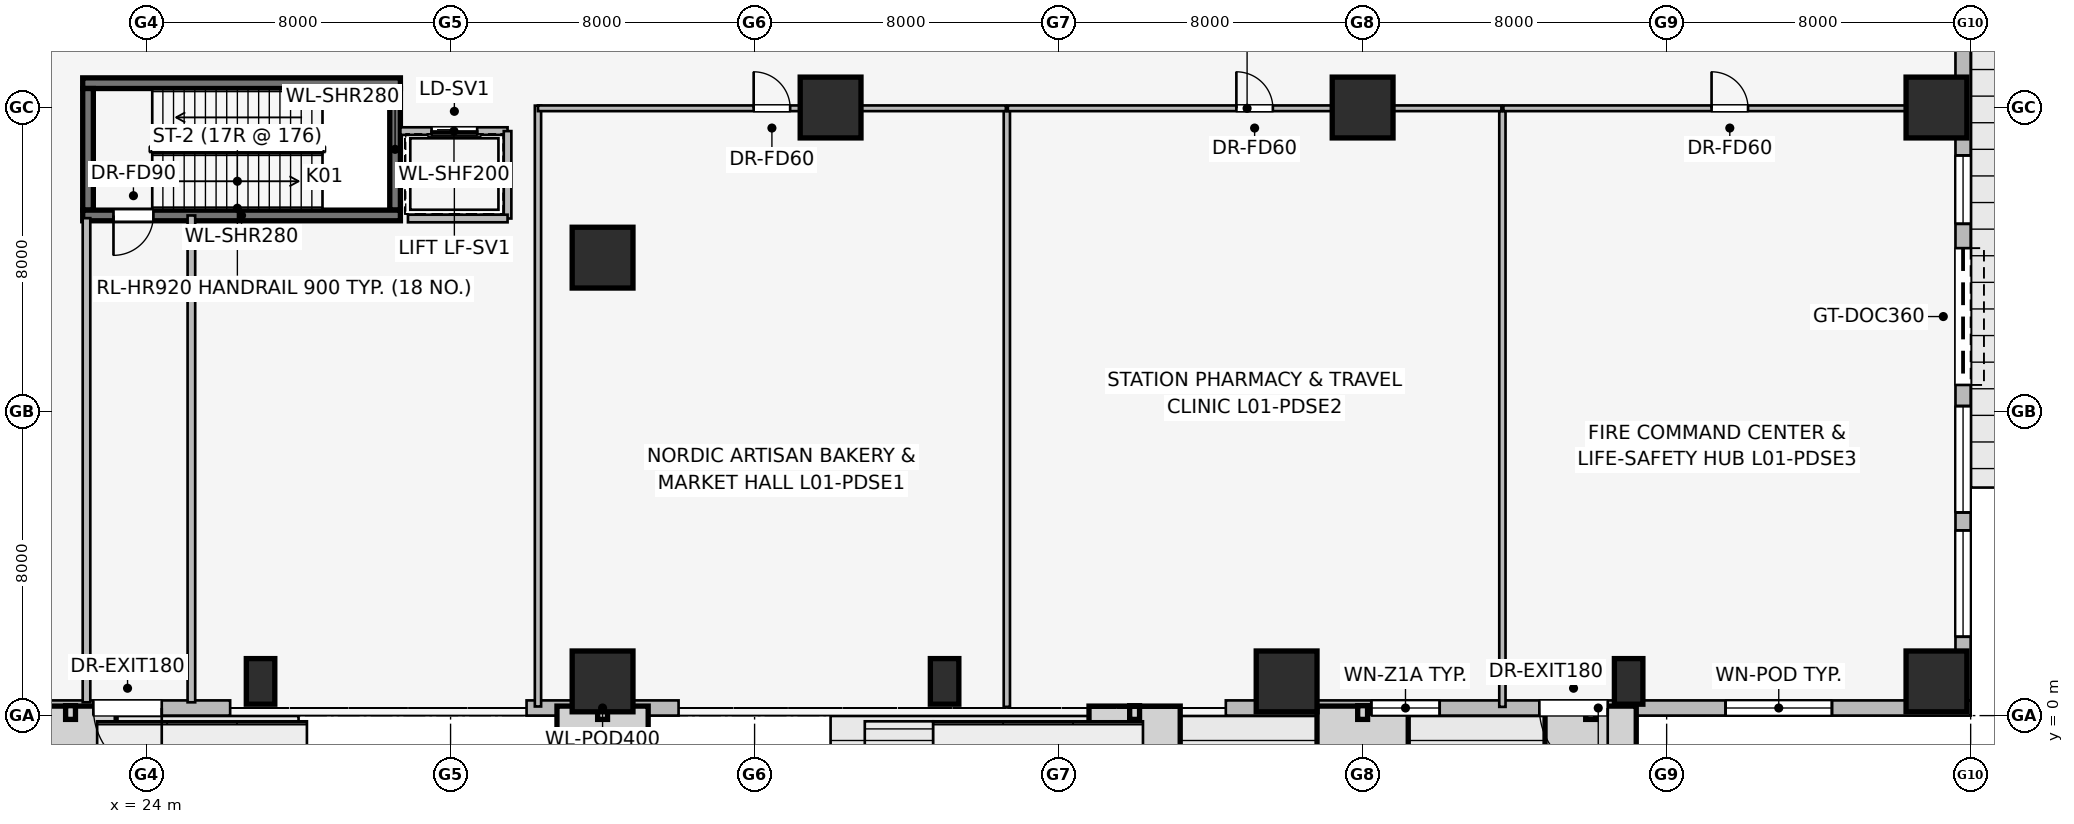
"""IFC4 building model, lengths in metres.
Left out: names, types, materials, properties, quantities, classifications, styles, units other than length and angle.
Written with IfcOpenShell. Run it as: python <this file> out.ifc"""

import sys

from ifc_helpers import new_model, si_unit, direction, frame, frame_2d, origin, origin_2d, place, context, subcontext, project, spatial, rectangle, extrude, element, fill, save


model = new_model("IFC4")
c1 = context("Model", 3, precision=1e-05, world=origin(), true_north=direction((0.0, 1.0)))
c2 = subcontext(c1, "Body", "Model", "MODEL_VIEW")
j1 = project(units=[si_unit("LENGTHUNIT", "METRE"), si_unit("PLANEANGLEUNIT", "RADIAN")], contexts=[c1])
p1 = place(None, origin())
s1 = spatial("IfcSite", under=j1, at=p1, CompositionType="ELEMENT")
p2 = place(p1, origin())
s2 = spatial("IfcBuilding", under=s1, at=p2, CompositionType="ELEMENT")
p3 = place(p2, origin())
s3 = spatial("IfcBuildingStorey", under=s2, at=p3, CompositionType="ELEMENT", Elevation=0.0)
p4 = place(p3, frame((30.68, 16.64, 0.0), z_axis=(0.0, 0.0, 1.0), x_axis=(-1.0, 0.0, 0.0)))
e1 = element("IfcWall", 1, at=p4, inside=s3, PredefinedType="SHEAR", context=c2, shape_type="SweptSolid", body=[
    extrude(rectangle(XDim=8.36, YDim=0.28, at=frame_2d((4.18, 0.0))), origin(), (0.0, 0.0, 1.0), 6.0),
])
for number, where, z_axis, x_axis in (
    (2, (22.46, 16.5, 0.0), (0.0, 0.0, 1.0), (0.0, -1.0, 0.0)),
    (3, (30.54, 13.3, 0.0), (0.0, 0.0, 1.0), (0.0, 1.0, 0.0)),
):
    element("IfcWall", number, at=place(p3, frame(where, z_axis=z_axis, x_axis=x_axis)), inside=s3, PredefinedType="SHEAR", context=c2, shape_type="SweptSolid", body=[
        extrude(rectangle(XDim=3.2, YDim=0.28, at=frame_2d((1.6, 0.0))), origin(), (0.0, 0.0, 1.0), 6.0),
    ])
p5 = place(p3, frame((30.68, 13.16, 0.0), z_axis=(0.0, 0.0, 1.0), x_axis=(-1.0, 0.0, 0.0)))
e4 = element("IfcWall", 4, at=p5, inside=s3, PredefinedType="SHEAR", context=c2, shape_type="SweptSolid", body=[
    extrude(rectangle(XDim=8.36, YDim=0.28, at=frame_2d((4.18, 0.0))), origin(), (0.0, 0.0, 1.0), 6.0),
])
p6 = place(p5, frame((6.5, 0.0, 0.0)))
e5 = element("IfcOpeningElement", 5, at=p6, cuts=e4, PredefinedType="OPENING", context=c2, shape_type="SweptSolid", body=[
    extrude(rectangle(XDim=1.05, YDim=2.0, at=frame_2d((0.525, 1.0))), frame((0.0, 0.15, 0.0), z_axis=(0.0, -1.0, 0.0), x_axis=(1.0, 0.0, 0.0)), (0.0, 0.0, 1.0), 0.3),
])
for number, where, z_axis, x_axis in (
    (6, (71.1, 0.9, 0.0), (0.0, 0.0, 1.0), (1.0, 0.0, 0.0)),
    (7, (36.0, 0.9, 0.0), (0.0, 0.0, 1.0), (1.0, 0.0, 0.0)),
    (8, (54.0, 0.9, 0.0), (0.0, 0.0, 1.0), (1.0, 0.0, 0.0)),
    (9, (71.1, 16.0, 0.0), (0.0, 0.0, 1.0), (1.0, 0.0, 0.0)),
    (10, (42.0, 16.0, 0.0), (0.0, 0.0, 1.0), (1.0, 0.0, 0.0)),
    (11, (56.0, 16.0, 0.0), (0.0, 0.0, 1.0), (1.0, 0.0, 0.0)),
    (12, (36.0, 12.05, 0.0), (0.0, 0.0, 1.0), (1.0, 0.0, 0.0)),
):
    element("IfcColumn", number, at=place(p3, frame(where, z_axis=z_axis, x_axis=x_axis)), inside=s3, PredefinedType="COLUMN", context=c2, shape_type="SweptSolid", body=[
        extrude(rectangle(XDim=1.6, YDim=1.6, at=origin_2d()), origin(), (0.0, 0.0, 1.0), 6.0),
    ])
for number, where, z_axis, x_axis in (
    (13, (27.0, 0.9, 0.0), (0.0, 0.0, 1.0), (1.0, 0.0, 0.0)),
    (14, (45.0, 0.9, 0.0), (0.0, 0.0, 1.0), (1.0, 0.0, 0.0)),
    (15, (63.0, 0.9, 0.0), (0.0, 0.0, 1.0), (1.0, 0.0, 0.0)),
):
    element("IfcColumn", number, at=place(p3, frame(where, z_axis=z_axis, x_axis=x_axis)), inside=s3, PredefinedType="PILASTER", context=c2, shape_type="SweptSolid", body=[
        extrude(rectangle(XDim=0.75, YDim=1.2, at=origin_2d()), origin(), (0.0, 0.0, 1.0), 6.0),
    ])
p7 = place(p3, frame((72.0, 0.2, 0.0), z_axis=(0.0, 0.0, 1.0), x_axis=(-1.0, 0.0, 0.0)))
e16 = element("IfcWall", 16, at=p7, inside=s3, PredefinedType="STANDARD", context=c2, shape_type="SweptSolid", body=[
    extrude(rectangle(XDim=19.6, YDim=0.4, at=frame_2d((9.8, 0.0))), origin(), (0.0, 0.0, 1.0), 5.69),
])
p8 = place(p7, frame((9.55, 0.0, 0.0)))
e17 = element("IfcOpeningElement", 17, at=p8, cuts=e16, PredefinedType="OPENING", context=c2, shape_type="SweptSolid", body=[
    extrude(rectangle(XDim=1.8, YDim=2.3, at=frame_2d((0.9, 1.15))), frame((0.0, 0.21, 0.0), z_axis=(0.0, -1.0, 0.0), x_axis=(1.0, 0.0, 0.0)), (0.0, 0.0, 1.0), 0.42),
])
p9 = place(p7, frame((3.65, 0.0, 0.75)))
e18 = element("IfcOpeningElement", 18, at=p9, cuts=e16, PredefinedType="OPENING", context=c2, shape_type="SweptSolid", body=[
    extrude(rectangle(XDim=2.8, YDim=1.8, at=frame_2d((1.4, 0.9))), frame((0.0, 0.21, 0.0), z_axis=(0.0, -1.0, 0.0), x_axis=(1.0, 0.0, 0.0)), (0.0, 0.0, 1.0), 0.42),
])
p10 = place(p7, frame((13.972, 0.0, 0.75)))
e19 = element("IfcOpeningElement", 19, at=p10, cuts=e16, PredefinedType="OPENING", context=c2, shape_type="SweptSolid", body=[
    extrude(rectangle(XDim=1.8, YDim=1.5, at=frame_2d((0.9, 0.75))), frame((0.0, 0.21, 0.0), z_axis=(0.0, -1.0, 0.0), x_axis=(1.0, 0.0, 0.0)), (0.0, 0.0, 1.0), 0.42),
])
p11 = place(p3, frame((38.0, 0.2, 0.0), z_axis=(0.0, 0.0, 1.0), x_axis=(-1.0, 0.0, 0.0)))
e20 = element("IfcWall", 20, at=p11, inside=s3, PredefinedType="STANDARD", context=c2, shape_type="SweptSolid", body=[
    extrude(rectangle(XDim=4.0, YDim=0.4, at=frame_2d((2.0, 0.0))), origin(), (0.0, 0.0, 1.0), 5.69),
])
p12 = place(p3, frame((26.2, 0.2, 0.0), z_axis=(0.0, 0.0, 1.0), x_axis=(-1.0, 0.0, 0.0)))
e21 = element("IfcWall", 21, at=p12, inside=s3, PredefinedType="STANDARD", context=c2, shape_type="SweptSolid", body=[
    extrude(rectangle(XDim=26.2, YDim=0.4, at=frame_2d((13.1, 0.0))), origin(), (0.0, 0.0, 1.0), 5.69),
])
p13 = place(p12, frame((1.8, 0.0, 0.0)))
e22 = element("IfcOpeningElement", 22, at=p13, cuts=e21, PredefinedType="OPENING", context=c2, shape_type="SweptSolid", body=[
    extrude(rectangle(XDim=1.8, YDim=2.3, at=frame_2d((0.9, 1.15))), frame((0.0, 0.21, 0.0), z_axis=(0.0, -1.0, 0.0), x_axis=(1.0, 0.0, 0.0)), (0.0, 0.0, 1.0), 0.42),
])
p14 = place(p12, frame((12.4, 0.0, 0.0)))
e23 = element("IfcOpeningElement", 23, at=p14, cuts=e21, PredefinedType="OPENING", context=c2, shape_type="SweptSolid", body=[
    extrude(rectangle(XDim=2.2, YDim=2.6, at=frame_2d((1.1, 1.3))), frame((0.0, 0.21, 0.0), z_axis=(0.0, -1.0, 0.0), x_axis=(1.0, 0.0, 0.0)), (0.0, 0.0, 1.0), 0.42),
])
p15 = place(p12, frame((5.11, 0.0, 0.75)))
e24 = element("IfcOpeningElement", 24, at=p15, cuts=e21, PredefinedType="OPENING", context=c2, shape_type="SweptSolid", body=[
    extrude(rectangle(XDim=2.8, YDim=1.8, at=frame_2d((1.4, 0.9))), frame((0.0, 0.21, 0.0), z_axis=(0.0, -1.0, 0.0), x_axis=(1.0, 0.0, 0.0)), (0.0, 0.0, 1.0), 0.42),
])
p16 = place(p12, frame((10.885, 0.0, 0.75)))
e25 = element("IfcOpeningElement", 25, at=p16, cuts=e21, PredefinedType="OPENING", context=c2, shape_type="SweptSolid", body=[
    extrude(rectangle(XDim=1.05, YDim=1.4, at=frame_2d((0.525, 0.7))), frame((0.0, 0.21, 0.0), z_axis=(0.0, -1.0, 0.0), x_axis=(1.0, 0.0, 0.0)), (0.0, 0.0, 1.0), 0.42),
])
p17 = place(p12, frame((15.165, 0.0, 0.75)))
e26 = element("IfcOpeningElement", 26, at=p17, cuts=e21, PredefinedType="OPENING", context=c2, shape_type="SweptSolid", body=[
    extrude(rectangle(XDim=1.05, YDim=1.4, at=frame_2d((0.525, 0.7))), frame((0.0, 0.21, 0.0), z_axis=(0.0, -1.0, 0.0), x_axis=(1.0, 0.0, 0.0)), (0.0, 0.0, 1.0), 0.42),
])
p18 = place(p12, frame((18.645, 0.0, 0.75)))
e27 = element("IfcOpeningElement", 27, at=p18, cuts=e21, PredefinedType="OPENING", context=c2, shape_type="SweptSolid", body=[
    extrude(rectangle(XDim=1.8, YDim=1.5, at=frame_2d((0.9, 0.75))), frame((0.0, 0.21, 0.0), z_axis=(0.0, -1.0, 0.0), x_axis=(1.0, 0.0, 0.0)), (0.0, 0.0, 1.0), 0.42),
])
p19 = place(p12, frame((21.855, 0.0, 0.75)))
e28 = element("IfcOpeningElement", 28, at=p19, cuts=e21, PredefinedType="OPENING", context=c2, shape_type="SweptSolid", body=[
    extrude(rectangle(XDim=1.8, YDim=1.5, at=frame_2d((0.9, 0.75))), frame((0.0, 0.21, 0.0), z_axis=(0.0, -1.0, 0.0), x_axis=(1.0, 0.0, 0.0)), (0.0, 0.0, 1.0), 0.42),
])
p20 = place(p3, frame((71.8, 24.0, 0.0), z_axis=(0.0, 0.0, 1.0), x_axis=(0.0, -1.0, 0.0)))
e29 = element("IfcWall", 29, at=p20, inside=s3, PredefinedType="STANDARD", context=c2, shape_type="SweptSolid", body=[
    extrude(rectangle(XDim=23.6, YDim=0.4, at=frame_2d((11.8, 0.0))), origin(), (0.0, 0.0, 1.0), 5.69),
])
p21 = place(p20, frame((2.55, 0.0, 0.0)))
e30 = element("IfcOpeningElement", 30, at=p21, cuts=e29, PredefinedType="OPENING", context=c2, shape_type="SweptSolid", body=[
    extrude(rectangle(XDim=1.8, YDim=2.3, at=frame_2d((0.9, 1.15))), frame((0.0, 0.21, 0.0), z_axis=(0.0, -1.0, 0.0), x_axis=(1.0, 0.0, 0.0)), (0.0, 0.0, 1.0), 0.42),
])
p22 = place(p20, frame((11.7, 0.0, 0.0)))
e31 = element("IfcOpeningElement", 31, at=p22, cuts=e29, PredefinedType="OPENING", context=c2, shape_type="SweptSolid", body=[
    extrude(rectangle(XDim=3.6, YDim=3.6, at=frame_2d((1.8, 1.8))), frame((0.0, 0.21, 0.0), z_axis=(0.0, -1.0, 0.0), x_axis=(1.0, 0.0, 0.0)), (0.0, 0.0, 1.0), 0.42),
])
p23 = place(p20, frame((5.435, 0.0, 0.75)))
e32 = element("IfcOpeningElement", 32, at=p23, cuts=e29, PredefinedType="OPENING", context=c2, shape_type="SweptSolid", body=[
    extrude(rectangle(XDim=1.05, YDim=1.4, at=frame_2d((0.525, 0.7))), frame((0.0, 0.21, 0.0), z_axis=(0.0, -1.0, 0.0), x_axis=(1.0, 0.0, 0.0)), (0.0, 0.0, 1.0), 0.42),
])
p24 = place(p20, frame((9.26, 0.0, 0.75)))
e33 = element("IfcOpeningElement", 33, at=p24, cuts=e29, PredefinedType="OPENING", context=c2, shape_type="SweptSolid", body=[
    extrude(rectangle(XDim=1.8, YDim=1.5, at=frame_2d((0.9, 0.75))), frame((0.0, 0.21, 0.0), z_axis=(0.0, -1.0, 0.0), x_axis=(1.0, 0.0, 0.0)), (0.0, 0.0, 1.0), 0.42),
])
p25 = place(p20, frame((15.855, 0.0, 0.75)))
e34 = element("IfcOpeningElement", 34, at=p25, cuts=e29, PredefinedType="OPENING", context=c2, shape_type="SweptSolid", body=[
    extrude(rectangle(XDim=2.8, YDim=1.8, at=frame_2d((1.4, 0.9))), frame((0.0, 0.21, 0.0), z_axis=(0.0, -1.0, 0.0), x_axis=(1.0, 0.0, 0.0)), (0.0, 0.0, 1.0), 0.42),
])
p26 = place(p20, frame((19.125, 0.0, 0.75)))
e35 = element("IfcOpeningElement", 35, at=p26, cuts=e29, PredefinedType="OPENING", context=c2, shape_type="SweptSolid", body=[
    extrude(rectangle(XDim=2.8, YDim=1.8, at=frame_2d((1.4, 0.9))), frame((0.0, 0.21, 0.0), z_axis=(0.0, -1.0, 0.0), x_axis=(1.0, 0.0, 0.0)), (0.0, 0.0, 1.0), 0.42),
])
p27 = place(p3, frame((33.5, 15.38, 0.0), z_axis=(0.0, 0.0, 1.0), x_axis=(-1.0, 0.0, 0.0)))
e36 = element("IfcWall", 36, at=p27, inside=s3, PredefinedType="PARTITIONING", context=c2, shape_type="SweptSolid", body=[
    extrude(rectangle(XDim=2.82, YDim=0.2, at=frame_2d((1.41, 0.0))), origin(), (0.0, 0.0, 1.0), 5.69),
])
p28 = place(p27, frame((0.8, 0.0, 0.0)))
e37 = element("IfcOpeningElement", 37, at=p28, cuts=e36, PredefinedType="OPENING", context=c2, shape_type="SweptSolid", body=[
    extrude(rectangle(XDim=1.2, YDim=2.2, at=frame_2d((0.6, 1.1))), frame((0.0, 0.11, 0.0), z_axis=(0.0, -1.0, 0.0), x_axis=(1.0, 0.0, 0.0)), (0.0, 0.0, 1.0), 0.22),
])
p29 = place(p3, frame((33.5, 13.08, 0.0), z_axis=(0.0, 0.0, 1.0), x_axis=(0.0, 1.0, 0.0)))
e38 = element("IfcWall", 38, at=p29, inside=s3, PredefinedType="PARTITIONING", context=c2, shape_type="SweptSolid", body=[
    extrude(rectangle(XDim=2.3, YDim=0.2, at=frame_2d((1.15, 0.0))), origin(), (0.0, 0.0, 1.0), 5.69),
])
p30 = place(p3, frame((30.879, 13.08, 0.0), z_axis=(0.0, 0.0, 1.0), x_axis=(1.0, 0.0, 0.0)))
e39 = element("IfcWall", 39, at=p30, inside=s3, PredefinedType="PARTITIONING", context=c2, shape_type="SweptSolid", body=[
    extrude(rectangle(XDim=2.621, YDim=0.2, at=frame_2d((1.311, 0.0))), origin(), (0.0, 0.0, 1.0), 5.69),
])
p31 = place(p3, frame((22.42, 0.35, 0.0), z_axis=(0.0, 0.0, 1.0), x_axis=(0.0, 1.0, 0.0)))
e40 = element("IfcWall", 40, at=p31, inside=s3, PredefinedType="PARTITIONING", context=c2, shape_type="SweptSolid", body=[
    extrude(rectangle(XDim=12.739, YDim=0.2, at=frame_2d((6.37, 0.0))), origin(), (0.0, 0.0, 1.0), 5.69),
])
p32 = place(p3, frame((25.18, 13.16, 0.0), z_axis=(0.0, 0.0, 1.0), x_axis=(0.0, -1.0, 0.0)))
e41 = element("IfcWall", 41, at=p32, inside=s3, PredefinedType="PARTITIONING", context=c2, shape_type="SweptSolid", body=[
    extrude(rectangle(XDim=12.81, YDim=0.2, at=frame_2d((6.405, 0.0))), origin(), (0.0, 0.0, 1.0), 5.082),
])
p33 = place(p3, frame((34.3, 0.24, 0.0), z_axis=(0.0, 0.0, 1.0), x_axis=(0.0, 1.0, 0.0)))
e42 = element("IfcWall", 42, at=p33, inside=s3, PredefinedType="PARTITIONING", context=c2, shape_type="SweptSolid", body=[
    extrude(rectangle(XDim=15.81, YDim=0.165, at=frame_2d((7.905, 0.0))), origin(), (0.0, 0.0, 1.0), 5.69),
])
p34 = place(p3, frame((46.638, 0.23, 0.0), z_axis=(0.0, 0.0, 1.0), x_axis=(0.0, 1.0, 0.0)))
e43 = element("IfcWall", 43, at=p34, inside=s3, PredefinedType="PARTITIONING", context=c2, shape_type="SweptSolid", body=[
    extrude(rectangle(XDim=15.68, YDim=0.165, at=frame_2d((7.84, 0.0))), origin(), (0.0, 0.0, 1.0), 5.082),
])
p35 = place(p3, frame((59.678, 0.23, 0.0), z_axis=(0.0, 0.0, 1.0), x_axis=(0.0, 1.0, 0.0)))
e44 = element("IfcWall", 44, at=p35, inside=s3, PredefinedType="PARTITIONING", context=c2, shape_type="SweptSolid", body=[
    extrude(rectangle(XDim=15.68, YDim=0.165, at=frame_2d((7.84, 0.0))), origin(), (0.0, 0.0, 1.0), 5.69),
])
p36 = place(p3, frame((34.3, 15.98, 0.0), z_axis=(0.0, 0.0, 1.0), x_axis=(1.0, 0.0, 0.0)))
e45 = element("IfcWall", 45, at=p36, inside=s3, PredefinedType="PARTITIONING", context=c2, shape_type="SweptSolid", body=[
    extrude(rectangle(XDim=12.312, YDim=0.15, at=frame_2d((6.156, 0.0))), origin(), (0.0, 0.0, 1.0), 4.742),
])
p37 = place(p36, frame((5.676, 0.0, 0.0)))
e46 = element("IfcOpeningElement", 46, at=p37, cuts=e45, PredefinedType="OPENING", context=c2, shape_type="SweptSolid", body=[
    extrude(rectangle(XDim=0.96, YDim=2.0, at=frame_2d((0.48, 1.0))), frame((0.0, 0.085, 0.0), z_axis=(0.0, -1.0, 0.0), x_axis=(1.0, 0.0, 0.0)), (0.0, 0.0, 1.0), 0.17),
])
p38 = place(p3, frame((46.664, 15.98, 0.0), z_axis=(0.0, 0.0, 1.0), x_axis=(1.0, 0.0, 0.0)))
e47 = element("IfcWall", 47, at=p38, inside=s3, PredefinedType="PARTITIONING", context=c2, shape_type="SweptSolid", body=[
    extrude(rectangle(XDim=12.988, YDim=0.15, at=frame_2d((6.494, 0.0))), origin(), (0.0, 0.0, 1.0), 4.742),
])
p39 = place(p38, frame((6.014, 0.0, 0.0)))
e48 = element("IfcOpeningElement", 48, at=p39, cuts=e47, PredefinedType="OPENING", context=c2, shape_type="SweptSolid", body=[
    extrude(rectangle(XDim=0.96, YDim=2.0, at=frame_2d((0.48, 1.0))), frame((0.0, 0.085, 0.0), z_axis=(0.0, -1.0, 0.0), x_axis=(1.0, 0.0, 0.0)), (0.0, 0.0, 1.0), 0.17),
])
p40 = place(p3, frame((59.704, 15.98, 0.0), z_axis=(0.0, 0.0, 1.0), x_axis=(1.0, 0.0, 0.0)))
e49 = element("IfcWall", 49, at=p40, inside=s3, PredefinedType="PARTITIONING", context=c2, shape_type="SweptSolid", body=[
    extrude(rectangle(XDim=11.916, YDim=0.15, at=frame_2d((5.958, 0.0))), origin(), (0.0, 0.0, 1.0), 4.742),
])
p41 = place(p40, frame((5.478, 0.0, 0.0)))
e50 = element("IfcOpeningElement", 50, at=p41, cuts=e49, PredefinedType="OPENING", context=c2, shape_type="SweptSolid", body=[
    extrude(rectangle(XDim=0.96, YDim=2.0, at=frame_2d((0.48, 1.0))), frame((0.0, 0.085, 0.0), z_axis=(0.0, -1.0, 0.0), x_axis=(1.0, 0.0, 0.0)), (0.0, 0.0, 1.0), 0.17),
])
p42 = place(p8, origin())
e51 = element("IfcDoor", 51, at=p42, inside=s3, OperationType="SINGLE_SWING_LEFT", PredefinedType="DOOR", context=c2, shape_type="SweptSolid", body=[
    extrude(rectangle(XDim=1.8, YDim=2.3, at=frame_2d((0.9, 1.15))), frame((0.0, 0.025, 0.0), z_axis=(0.0, -1.0, 0.0), x_axis=(1.0, 0.0, 0.0)), (0.0, 0.0, 1.0), 0.05),
])
fill(e17, e51)
p43 = place(p9, origin())
e52 = element("IfcWindow", 52, at=p43, inside=s3, PartitioningType="SINGLE_PANEL", PredefinedType="WINDOW", context=c2, shape_type="SweptSolid", body=[
    extrude(rectangle(XDim=2.8, YDim=1.8, at=frame_2d((1.4, 0.9))), frame((0.0, 0.03, 0.0), z_axis=(0.0, -1.0, 0.0), x_axis=(1.0, 0.0, 0.0)), (0.0, 0.0, 1.0), 0.06),
])
fill(e18, e52)
p44 = place(p10, origin())
e53 = element("IfcWindow", 53, at=p44, inside=s3, PartitioningType="SINGLE_PANEL", PredefinedType="WINDOW", context=c2, shape_type="SweptSolid", body=[
    extrude(rectangle(XDim=1.8, YDim=1.5, at=frame_2d((0.9, 0.75))), frame((0.0, 0.03, 0.0), z_axis=(0.0, -1.0, 0.0), x_axis=(1.0, 0.0, 0.0)), (0.0, 0.0, 1.0), 0.06),
])
fill(e19, e53)
p45 = place(p13, origin())
e54 = element("IfcDoor", 54, at=p45, inside=s3, OperationType="SINGLE_SWING_LEFT", PredefinedType="DOOR", context=c2, shape_type="SweptSolid", body=[
    extrude(rectangle(XDim=1.8, YDim=2.3, at=frame_2d((0.9, 1.15))), frame((0.0, 0.025, 0.0), z_axis=(0.0, -1.0, 0.0), x_axis=(1.0, 0.0, 0.0)), (0.0, 0.0, 1.0), 0.05),
])
fill(e22, e54)
p46 = place(p22, origin())
e55 = element("IfcDoor", 55, at=p46, inside=s3, OperationType="ROLLINGUP", PredefinedType="GATE", context=c2, shape_type="SweptSolid", body=[
    extrude(rectangle(XDim=3.6, YDim=3.6, at=frame_2d((1.8, 1.8))), frame((0.0, 0.025, 0.0), z_axis=(0.0, -1.0, 0.0), x_axis=(1.0, 0.0, 0.0)), (0.0, 0.0, 1.0), 0.05),
])
fill(e31, e55)
p47 = place(p24, origin())
e56 = element("IfcWindow", 56, at=p47, inside=s3, PartitioningType="SINGLE_PANEL", PredefinedType="WINDOW", context=c2, shape_type="SweptSolid", body=[
    extrude(rectangle(XDim=1.8, YDim=1.5, at=frame_2d((0.9, 0.75))), frame((0.0, 0.03, 0.0), z_axis=(0.0, -1.0, 0.0), x_axis=(1.0, 0.0, 0.0)), (0.0, 0.0, 1.0), 0.06),
])
fill(e33, e56)
p48 = place(p25, origin())
e57 = element("IfcWindow", 57, at=p48, inside=s3, PartitioningType="SINGLE_PANEL", PredefinedType="WINDOW", context=c2, shape_type="SweptSolid", body=[
    extrude(rectangle(XDim=2.8, YDim=1.8, at=frame_2d((1.4, 0.9))), frame((0.0, 0.03, 0.0), z_axis=(0.0, -1.0, 0.0), x_axis=(1.0, 0.0, 0.0)), (0.0, 0.0, 1.0), 0.06),
])
fill(e34, e57)
p49 = place(p26, origin())
e58 = element("IfcWindow", 58, at=p49, inside=s3, PartitioningType="SINGLE_PANEL", PredefinedType="WINDOW", context=c2, shape_type="SweptSolid", body=[
    extrude(rectangle(XDim=2.8, YDim=1.8, at=frame_2d((1.4, 0.9))), frame((0.0, 0.03, 0.0), z_axis=(0.0, -1.0, 0.0), x_axis=(1.0, 0.0, 0.0)), (0.0, 0.0, 1.0), 0.06),
])
fill(e35, e58)
p50 = place(p6, origin())
e59 = element("IfcDoor", 59, at=p50, inside=s3, OperationType="SINGLE_SWING_RIGHT", PredefinedType="DOOR", context=c2, shape_type="SweptSolid", body=[
    extrude(rectangle(XDim=1.05, YDim=2.0, at=frame_2d((0.525, 1.0))), frame((0.0, 0.025, 0.0), z_axis=(0.0, -1.0, 0.0), x_axis=(1.0, 0.0, 0.0)), (0.0, 0.0, 1.0), 0.05),
])
fill(e5, e59)
p51 = place(p28, origin())
e60 = element("IfcDoor", 60, at=p51, inside=s3, OperationType="SLIDING_TO_RIGHT", PredefinedType="DOOR", context=c2, shape_type="SweptSolid", body=[
    extrude(rectangle(XDim=1.2, YDim=2.2, at=frame_2d((0.6, 1.1))), frame((0.0, 0.025, 0.0), z_axis=(0.0, -1.0, 0.0), x_axis=(1.0, 0.0, 0.0)), (0.0, 0.0, 1.0), 0.05),
])
fill(e37, e60)
p52 = place(p37, origin())
e61 = element("IfcDoor", 61, at=p52, inside=s3, OperationType="SINGLE_SWING_LEFT", PredefinedType="DOOR", context=c2, shape_type="SweptSolid", body=[
    extrude(rectangle(XDim=0.96, YDim=2.0, at=frame_2d((0.48, 1.0))), frame((0.0, 0.025, 0.0), z_axis=(0.0, -1.0, 0.0), x_axis=(1.0, 0.0, 0.0)), (0.0, 0.0, 1.0), 0.05),
])
fill(e46, e61)
p53 = place(p39, origin())
e62 = element("IfcDoor", 62, at=p53, inside=s3, OperationType="SINGLE_SWING_LEFT", PredefinedType="DOOR", context=c2, shape_type="SweptSolid", body=[
    extrude(rectangle(XDim=0.96, YDim=2.0, at=frame_2d((0.48, 1.0))), frame((0.0, 0.025, 0.0), z_axis=(0.0, -1.0, 0.0), x_axis=(1.0, 0.0, 0.0)), (0.0, 0.0, 1.0), 0.05),
])
fill(e48, e62)
p54 = place(p41, origin())
e63 = element("IfcDoor", 63, at=p54, inside=s3, OperationType="SINGLE_SWING_LEFT", PredefinedType="DOOR", context=c2, shape_type="SweptSolid", body=[
    extrude(rectangle(XDim=0.96, YDim=2.0, at=frame_2d((0.48, 1.0))), frame((0.0, 0.025, 0.0), z_axis=(0.0, -1.0, 0.0), x_axis=(1.0, 0.0, 0.0)), (0.0, 0.0, 1.0), 0.05),
])
fill(e50, e63)
save(model, sys.argv[1])
